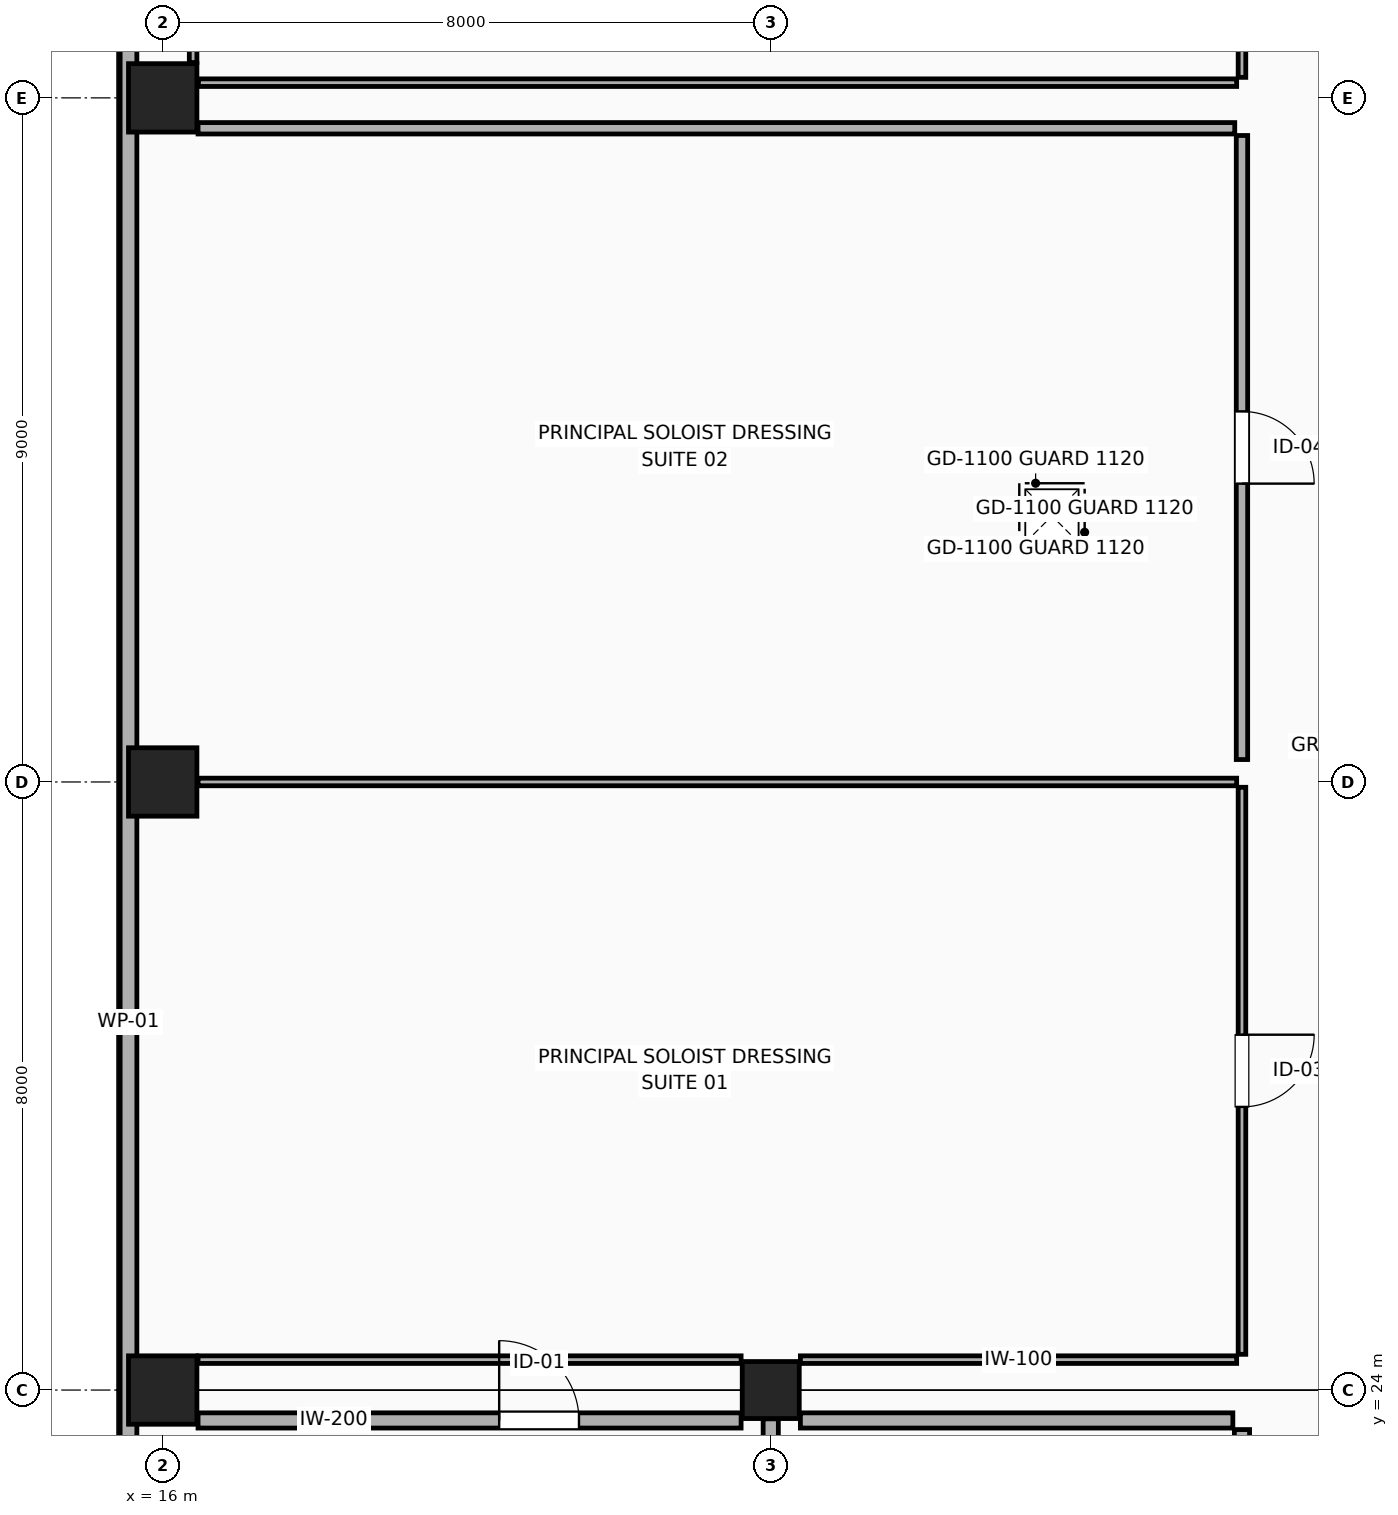
"""IFC4 building model, lengths in metres.
Left out: names, types, materials, properties, quantities, classifications, styles, units other than length and angle.
Written with IfcOpenShell. Run it as: python <this file> out.ifc"""

import sys

from ifc_helpers import new_model, si_unit, direction, frame, frame_2d, origin, origin_2d, place, context, subcontext, project, spatial, rectangle, extrude, element, fill, save


model = new_model("IFC4")
c1 = context("Model", 3, precision=1e-05, world=origin(), true_north=direction((0.0, 1.0)))
c2 = subcontext(c1, "Body", "Model", "MODEL_VIEW")
j1 = project(units=[si_unit("LENGTHUNIT", "METRE"), si_unit("PLANEANGLEUNIT", "RADIAN")], contexts=[c1])
p1 = place(None, origin())
s1 = spatial("IfcSite", under=j1, at=p1, CompositionType="ELEMENT")
p2 = place(p1, origin())
s2 = spatial("IfcBuilding", under=s1, at=p2, CompositionType="ELEMENT")
p3 = place(p2, origin())
s3 = spatial("IfcBuildingStorey", under=s2, at=p3, CompositionType="ELEMENT", Elevation=0.0)
for number, where, z_axis, x_axis in (
    (1, (16.0, 24.0, 0.0), (0.0, 0.0, 1.0), (1.0, 0.0, 0.0)),
    (2, (16.0, 32.0, 0.0), (0.0, 0.0, 1.0), (1.0, 0.0, 0.0)),
    (3, (16.0, 41.0, 0.0), (0.0, 0.0, 1.0), (1.0, 0.0, 0.0)),
):
    element("IfcColumn", number, at=place(p3, frame(where, z_axis=z_axis, x_axis=x_axis)), inside=s3, PredefinedType="COLUMN", context=c2, shape_type="SweptSolid", body=[
        extrude(rectangle(XDim=0.9, YDim=0.9, at=origin_2d()), origin(), (0.0, 0.0, 1.0), 5.4),
    ])
p4 = place(p3, frame((24.0, 24.0, 0.0), z_axis=(0.0, 0.0, 1.0), x_axis=(1.0, 0.0, 0.0)))
e4 = element("IfcColumn", 4, at=p4, inside=s3, PredefinedType="COLUMN", context=c2, shape_type="SweptSolid", body=[
    extrude(rectangle(XDim=0.75, YDim=0.75, at=origin_2d()), origin(), (0.0, 0.0, 1.0), 5.4),
])
p5 = place(p3, frame((15.55, 18.25, 0.0), z_axis=(0.0, 0.0, 1.0), x_axis=(0.0, 1.0, 0.0)))
e5 = element("IfcWall", 5, at=p5, inside=s3, PredefinedType="PARAPET", context=c2, shape_type="SweptSolid", body=[
    extrude(rectangle(XDim=38.2, YDim=0.22, at=frame_2d((19.1, 0.0))), origin(), (0.0, 0.0, 1.0), 1.25),
])
p6 = place(p3, frame((16.465, 23.6, 0.0), z_axis=(0.0, 0.0, 1.0), x_axis=(1.0, 0.0, 0.0)))
e6 = element("IfcWall", 6, at=p6, inside=s3, PredefinedType="PARTITIONING", context=c2, shape_type="SweptSolid", body=[
    extrude(rectangle(XDim=7.145, YDim=0.2, at=frame_2d((3.573, 0.0))), origin(), (0.0, 0.0, 1.0), 5.11),
])
p7 = place(p6, frame((3.962, 0.0, 0.0)))
e7 = element("IfcOpeningElement", 7, at=p7, cuts=e6, PredefinedType="OPENING", context=c2, shape_type="SweptSolid", body=[
    extrude(rectangle(XDim=1.05, YDim=2.15, at=frame_2d((0.525, 1.075))), frame((0.0, 0.11, 0.0), z_axis=(0.0, -1.0, 0.0), x_axis=(1.0, 0.0, 0.0)), (0.0, 0.0, 1.0), 0.22),
])
p8 = place(p3, frame((24.0, 23.621, 0.0), z_axis=(0.0, 0.0, 1.0), x_axis=(0.0, -1.0, 0.0)))
e8 = element("IfcWall", 8, at=p8, inside=s3, PredefinedType="PARTITIONING", context=c2, shape_type="SweptSolid", body=[
    extrude(rectangle(XDim=2.001, YDim=0.2, at=frame_2d((1.0, 0.0))), origin(), (0.0, 0.0, 1.0), 5.11),
])
p9 = place(p3, frame((24.39, 23.6, 0.0), z_axis=(0.0, 0.0, 1.0), x_axis=(1.0, 0.0, 0.0)))
e9 = element("IfcWall", 9, at=p9, inside=s3, PredefinedType="PARTITIONING", context=c2, shape_type="SweptSolid", body=[
    extrude(rectangle(XDim=5.69, YDim=0.2, at=frame_2d((2.845, 0.0))), origin(), (0.0, 0.0, 1.0), 5.11),
])
p10 = place(p3, frame((30.2, 23.48, 0.0), z_axis=(0.0, 0.0, 1.0), x_axis=(0.0, -1.0, 0.0)))
e10 = element("IfcWall", 10, at=p10, inside=s3, PredefinedType="PARTITIONING", context=c2, shape_type="SweptSolid", body=[
    extrude(rectangle(XDim=7.36, YDim=0.2, at=frame_2d((3.68, 0.0))), origin(), (0.0, 0.0, 1.0), 5.11),
])
p11 = place(p10, frame((0.897, 0.0, 0.0)))
e11 = element("IfcOpeningElement", 11, at=p11, cuts=e10, PredefinedType="OPENING", context=c2, shape_type="SweptSolid", body=[
    extrude(rectangle(XDim=0.95, YDim=2.15, at=frame_2d((0.475, 1.075))), frame((0.0, 0.11, 0.0), z_axis=(0.0, -1.0, 0.0), x_axis=(1.0, 0.0, 0.0)), (0.0, 0.0, 1.0), 0.22),
])
p12 = place(p3, frame((30.13, 24.4, 0.0), z_axis=(0.0, 0.0, 1.0), x_axis=(-1.0, 0.0, 0.0)))
e12 = element("IfcWall", 12, at=p12, inside=s3, PredefinedType="PARTITIONING", context=c2, shape_type="SweptSolid", body=[
    extrude(rectangle(XDim=5.74, YDim=0.1, at=frame_2d((2.87, 0.0))), origin(), (0.0, 0.0, 1.0), 5.11),
])
p13 = place(p3, frame((23.61, 24.4, 0.0), z_axis=(0.0, 0.0, 1.0), x_axis=(-1.0, 0.0, 0.0)))
e13 = element("IfcWall", 13, at=p13, inside=s3, PredefinedType="PARTITIONING", context=c2, shape_type="SweptSolid", body=[
    extrude(rectangle(XDim=7.145, YDim=0.1, at=frame_2d((3.573, 0.0))), origin(), (0.0, 0.0, 1.0), 5.11),
])
p14 = place(p3, frame((16.465, 32.0, 0.0), z_axis=(0.0, 0.0, 1.0), x_axis=(1.0, 0.0, 0.0)))
e14 = element("IfcWall", 14, at=p14, inside=s3, PredefinedType="PARTITIONING", context=c2, shape_type="SweptSolid", body=[
    extrude(rectangle(XDim=13.665, YDim=0.1, at=frame_2d((6.833, 0.0))), origin(), (0.0, 0.0, 1.0), 4.5),
])
p15 = place(p3, frame((30.2, 31.93, 0.0), z_axis=(0.0, 0.0, 1.0), x_axis=(0.0, -1.0, 0.0)))
e15 = element("IfcWall", 15, at=p15, inside=s3, PredefinedType="PARTITIONING", context=c2, shape_type="SweptSolid", body=[
    extrude(rectangle(XDim=7.46, YDim=0.1, at=frame_2d((3.73, 0.0))), origin(), (0.0, 0.0, 1.0), 5.11),
])
p16 = place(p15, frame((3.255, 0.0, 0.0)))
e16 = element("IfcOpeningElement", 16, at=p16, cuts=e15, PredefinedType="OPENING", context=c2, shape_type="SweptSolid", body=[
    extrude(rectangle(XDim=0.95, YDim=2.15, at=frame_2d((0.475, 1.075))), frame((0.0, 0.06, 0.0), z_axis=(0.0, -1.0, 0.0), x_axis=(1.0, 0.0, 0.0)), (0.0, 0.0, 1.0), 0.12),
])
p17 = place(p3, frame((16.465, 40.6, 0.0), z_axis=(0.0, 0.0, 1.0), x_axis=(1.0, 0.0, 0.0)))
e17 = element("IfcWall", 17, at=p17, inside=s3, PredefinedType="PARTITIONING", context=c2, shape_type="SweptSolid", body=[
    extrude(rectangle(XDim=13.64, YDim=0.15, at=frame_2d((6.82, 0.0))), origin(), (0.0, 0.0, 1.0), 5.11),
])
p18 = place(p3, frame((30.2, 40.505, 0.0), z_axis=(0.0, 0.0, 1.0), x_axis=(0.0, -1.0, 0.0)))
e18 = element("IfcWall", 18, at=p18, inside=s3, PredefinedType="PARTITIONING", context=c2, shape_type="SweptSolid", body=[
    extrude(rectangle(XDim=8.21, YDim=0.15, at=frame_2d((4.105, 0.0))), origin(), (0.0, 0.0, 1.0), 5.11),
])
p19 = place(p18, frame((3.63, 0.0, 0.0)))
e19 = element("IfcOpeningElement", 19, at=p19, cuts=e18, PredefinedType="OPENING", context=c2, shape_type="SweptSolid", body=[
    extrude(rectangle(XDim=0.95, YDim=2.15, at=frame_2d((0.475, 1.075))), frame((0.0, 0.085, 0.0), z_axis=(0.0, -1.0, 0.0), x_axis=(1.0, 0.0, 0.0)), (0.0, 0.0, 1.0), 0.17),
])
p20 = place(p3, frame((30.2, 49.53, 0.0), z_axis=(0.0, 0.0, 1.0), x_axis=(0.0, -1.0, 0.0)))
e20 = element("IfcWall", 20, at=p20, inside=s3, PredefinedType="PARTITIONING", context=c2, shape_type="SweptSolid", body=[
    extrude(rectangle(XDim=8.26, YDim=0.1, at=frame_2d((4.13, 0.0))), origin(), (0.0, 0.0, 1.0), 5.11),
])
p21 = place(p20, frame((3.605, 0.0, 0.0)))
e21 = element("IfcOpeningElement", 21, at=p21, cuts=e20, PredefinedType="OPENING", context=c2, shape_type="SweptSolid", body=[
    extrude(rectangle(XDim=1.05, YDim=2.15, at=frame_2d((0.525, 1.075))), frame((0.0, 0.06, 0.0), z_axis=(0.0, -1.0, 0.0), x_axis=(1.0, 0.0, 0.0)), (0.0, 0.0, 1.0), 0.12),
])
p22 = place(p3, frame((30.13, 41.2, 0.0), z_axis=(0.0, 0.0, 1.0), x_axis=(-1.0, 0.0, 0.0)))
e22 = element("IfcWall", 22, at=p22, inside=s3, PredefinedType="PARTITIONING", context=c2, shape_type="SweptSolid", body=[
    extrude(rectangle(XDim=13.66, YDim=0.1, at=frame_2d((6.83, 0.0))), origin(), (0.0, 0.0, 1.0), 4.5),
])
p23 = place(p3, frame((16.4, 41.465, 0.0), z_axis=(0.0, 0.0, 1.0), x_axis=(0.0, 1.0, 0.0)))
e23 = element("IfcWall", 23, at=p23, inside=s3, PredefinedType="PARTITIONING", context=c2, shape_type="SweptSolid", body=[
    extrude(rectangle(XDim=8.065, YDim=0.1, at=frame_2d((4.032, 0.0))), origin(), (0.0, 0.0, 1.0), 5.11),
])
p24 = place(p7, origin())
e24 = element("IfcDoor", 24, at=p24, inside=s3, OperationType="SINGLE_SWING_LEFT", PredefinedType="DOOR", context=c2, shape_type="SweptSolid", body=[
    extrude(rectangle(XDim=1.05, YDim=2.15, at=frame_2d((0.525, 1.075))), frame((0.0, 0.025, 0.0), z_axis=(0.0, -1.0, 0.0), x_axis=(1.0, 0.0, 0.0)), (0.0, 0.0, 1.0), 0.05),
])
fill(e7, e24)
p25 = place(p16, origin())
e25 = element("IfcDoor", 25, at=p25, inside=s3, OperationType="SINGLE_SWING_LEFT", PredefinedType="DOOR", context=c2, shape_type="SweptSolid", body=[
    extrude(rectangle(XDim=0.95, YDim=2.15, at=frame_2d((0.475, 1.075))), frame((0.0, 0.025, 0.0), z_axis=(0.0, -1.0, 0.0), x_axis=(1.0, 0.0, 0.0)), (0.0, 0.0, 1.0), 0.05),
])
fill(e16, e25)
p26 = place(p19, origin())
e26 = element("IfcDoor", 26, at=p26, inside=s3, OperationType="SINGLE_SWING_RIGHT", PredefinedType="DOOR", context=c2, shape_type="SweptSolid", body=[
    extrude(rectangle(XDim=0.95, YDim=2.15, at=frame_2d((0.475, 1.075))), frame((0.0, 0.025, 0.0), z_axis=(0.0, -1.0, 0.0), x_axis=(1.0, 0.0, 0.0)), (0.0, 0.0, 1.0), 0.05),
])
fill(e19, e26)
save(model, sys.argv[1])
